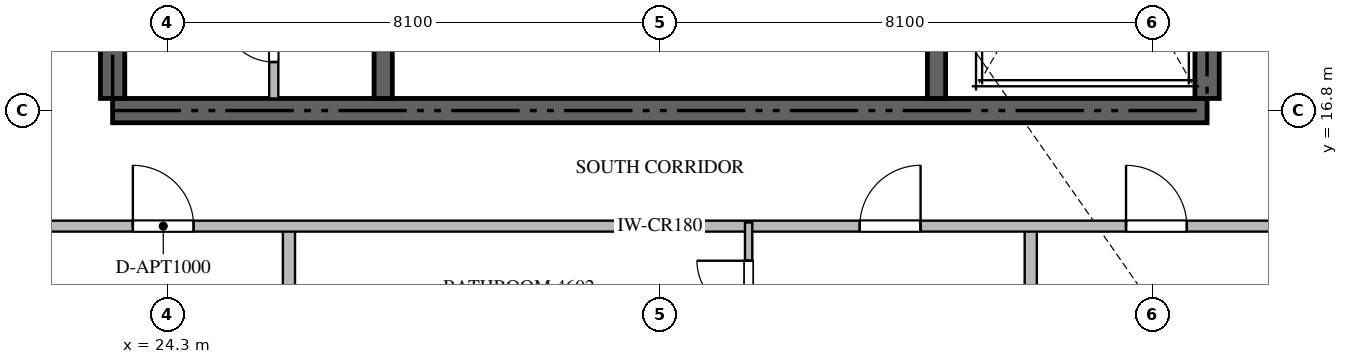
"""IFC4 building model, lengths in metres.
Left out: names, types, materials, properties, quantities, classifications, styles, units other than length and angle.
Written with IfcOpenShell. Run it as: python <this file> out.ifc"""

import sys

from ifc_helpers import new_model, si_unit, direction, frame, frame_2d, origin, place, context, subcontext, project, spatial, rectangle, extrude, source, transform, mapped, element, fill, save


model = new_model("IFC4")
c1 = context("Model", 3, precision=1e-05, world=origin(), true_north=direction((0.0, 1.0)))
c2 = subcontext(c1, "Body", "Model", "MODEL_VIEW")
j1 = project(units=[si_unit("LENGTHUNIT", "METRE"), si_unit("PLANEANGLEUNIT", "RADIAN")], contexts=[c1])
p1 = place(None, origin())
s1 = spatial("IfcSite", under=j1, at=p1, CompositionType="ELEMENT")
p2 = place(p1, origin())
s2 = spatial("IfcBuilding", under=s1, at=p2, CompositionType="ELEMENT")
p3 = place(p2, frame((0.0, 0.0, 183.9)))
s3 = spatial("IfcBuildingStorey", under=s2, at=p3, CompositionType="ELEMENT", Elevation=183.9)
p4 = place(p3, frame((23.4, 16.8, -0.26), z_axis=(0.0, 0.0, 1.0), x_axis=(1.0, 0.0, 0.0)))
e1 = element("IfcWall", 1, at=p4, inside=s3, PredefinedType="SHEAR", context=c2, shape_type="SweptSolid", body=[
    extrude(rectangle(XDim=18.0, YDim=0.4, at=frame_2d((9.0, 0.0))), origin(), (0.0, 0.0, 1.0), 3.748),
])
p5 = place(p3, frame((23.4, 17.0, -0.26), z_axis=(0.0, 0.0, 1.0), x_axis=(0.0, 1.0, 0.0)))
e2 = element("IfcWall", 2, at=p5, inside=s3, PredefinedType="SHEAR", context=c2, shape_type="SweptSolid", body=[
    extrude(rectangle(XDim=4.85, YDim=0.4, at=frame_2d((2.425, 0.0))), origin(), (0.0, 0.0, 1.0), 3.748),
])
p6 = place(p3, frame((41.4, 17.0, -0.26), z_axis=(0.0, 0.0, 1.0), x_axis=(0.0, 1.0, 0.0)))
e3 = element("IfcWall", 3, at=p6, inside=s3, PredefinedType="SHEAR", context=c2, shape_type="SweptSolid", body=[
    extrude(rectangle(XDim=8.35, YDim=0.4, at=frame_2d((4.175, 0.0))), origin(), (0.0, 0.0, 1.0), 3.748),
])
p7 = place(p3, frame((27.85, 17.0, -0.26), z_axis=(0.0, 0.0, 1.0), x_axis=(0.0, 1.0, 0.0)))
e4 = element("IfcWall", 4, at=p7, inside=s3, PredefinedType="SHEAR", context=c2, shape_type="SweptSolid", body=[
    extrude(rectangle(XDim=4.85, YDim=0.3, at=frame_2d((2.425, 0.0))), origin(), (0.0, 0.0, 1.0), 3.748),
])
p8 = place(p3, frame((36.95, 17.0, -0.26), z_axis=(0.0, 0.0, 1.0), x_axis=(0.0, 1.0, 0.0)))
e5 = element("IfcWall", 5, at=p8, inside=s3, PredefinedType="SHEAR", context=c2, shape_type="SweptSolid", body=[
    extrude(rectangle(XDim=8.35, YDim=0.3, at=frame_2d((4.175, 0.0))), origin(), (0.0, 0.0, 1.0), 3.748),
])
p9 = place(p3, frame((26.05, 17.0, 0.0), z_axis=(0.0, 0.0, 1.0), x_axis=(0.0, 1.0, 0.0)))
e6 = element("IfcWall", 6, at=p9, inside=s3, PredefinedType="PARTITIONING", context=c2, shape_type="SweptSolid", body=[
    extrude(rectangle(XDim=2.048, YDim=0.15, at=frame_2d((1.024, 0.0))), origin(), (0.0, 0.0, 1.0), 3.49),
])
p10 = place(p9, frame((0.599, 0.0, 0.0)))
e7 = element("IfcOpeningElement", 7, at=p10, cuts=e6, PredefinedType="OPENING", context=c2, shape_type="SweptSolid", body=[
    extrude(rectangle(XDim=0.85, YDim=2.1, at=frame_2d((0.425, 1.05))), frame((0.0, 0.085, 0.0), z_axis=(0.0, -1.0, 0.0), x_axis=(1.0, 0.0, 0.0)), (0.0, 0.0, 1.0), 0.17),
])
for number, where, z_axis, x_axis in (
    (8, (26.3, 1.482, 0.0), (0.0, 0.0, 1.0), (0.0, 1.0, 0.0)),
    (9, (38.5, 1.482, 0.0), (0.0, 0.0, 1.0), (0.0, 1.0, 0.0)),
):
    element("IfcWall", number, at=place(p3, frame(where, z_axis=z_axis, x_axis=x_axis)), inside=s3, PredefinedType="PARTITIONING", context=c2, shape_type="SweptSolid", body=[
        extrude(rectangle(XDim=13.418, YDim=0.2, at=frame_2d((6.709, 0.0))), origin(), (0.0, 0.0, 1.0), 3.49),
    ])
p11 = place(p3, frame((20.952, 14.9, 0.0), z_axis=(0.0, 0.0, 1.0), x_axis=(1.0, 0.0, 0.0)))
e10 = element("IfcWall", 10, at=p11, inside=s3, PredefinedType="PARTITIONING", context=c2, shape_type="SweptSolid", body=[
    extrude(rectangle(XDim=22.896, YDim=0.18, at=frame_2d((11.448, 0.0))), origin(), (0.0, 0.0, 1.0), 3.49),
])
p12 = place(p11, frame((2.781, 0.0, 0.0)))
e11 = element("IfcOpeningElement", 11, at=p12, cuts=e10, PredefinedType="OPENING", context=c2, shape_type="SweptSolid", body=[
    extrude(rectangle(XDim=1.0, YDim=2.15, at=frame_2d((0.5, 1.075))), frame((0.0, 0.1, 0.0), z_axis=(0.0, -1.0, 0.0), x_axis=(1.0, 0.0, 0.0)), (0.0, 0.0, 1.0), 0.2),
])
p13 = place(p11, frame((14.736, 0.0, 0.0)))
e12 = element("IfcOpeningElement", 12, at=p13, cuts=e10, PredefinedType="OPENING", context=c2, shape_type="SweptSolid", body=[
    extrude(rectangle(XDim=1.0, YDim=2.15, at=frame_2d((0.5, 1.075))), frame((0.0, 0.1, 0.0), z_axis=(0.0, -1.0, 0.0), x_axis=(1.0, 0.0, 0.0)), (0.0, 0.0, 1.0), 0.2),
])
p14 = place(p11, frame((19.115, 0.0, 0.0)))
e13 = element("IfcOpeningElement", 13, at=p14, cuts=e10, PredefinedType="OPENING", context=c2, shape_type="SweptSolid", body=[
    extrude(rectangle(XDim=1.0, YDim=2.15, at=frame_2d((0.5, 1.075))), frame((0.0, 0.1, 0.0), z_axis=(0.0, -1.0, 0.0), x_axis=(1.0, 0.0, 0.0)), (0.0, 0.0, 1.0), 0.2),
])
p15 = place(p3, frame((33.86, 12.852, 0.0), z_axis=(0.0, 0.0, 1.0), x_axis=(0.0, 1.0, 0.0)))
e14 = element("IfcWall", 14, at=p15, inside=s3, PredefinedType="PARTITIONING", context=c2, shape_type="SweptSolid", body=[
    extrude(rectangle(XDim=2.108, YDim=0.12, at=frame_2d((1.054, 0.0))), origin(), (0.0, 0.0, 1.0), 3.49),
])
p16 = place(p15, frame((0.629, 0.0, 0.0)))
e15 = element("IfcOpeningElement", 15, at=p16, cuts=e14, PredefinedType="OPENING", context=c2, shape_type="SweptSolid", body=[
    extrude(rectangle(XDim=0.85, YDim=2.1, at=frame_2d((0.425, 1.05))), frame((0.0, 0.07, 0.0), z_axis=(0.0, -1.0, 0.0), x_axis=(1.0, 0.0, 0.0)), (0.0, 0.0, 1.0), 0.14),
])
m1 = source(origin(), c2, "Body", "SweptSolid", [
    extrude(rectangle(XDim=0.85, YDim=2.1, at=frame_2d((0.425, 1.05))), frame((0.0, 0.025, 0.0), z_axis=(0.0, -1.0, 0.0), x_axis=(1.0, 0.0, 0.0)), (0.0, 0.0, 1.0), 0.05),
])
p17 = place(p10, origin())
e16 = element("IfcDoor", 16, at=p17, inside=s3, OperationType="SINGLE_SWING_RIGHT", PredefinedType="DOOR", context=c2, shape_type="MappedRepresentation", body=[
    mapped(m1, transform((0.0, 0.0, 0.0), scale=1.0)),
])
fill(e7, e16)
m2 = source(origin(), c2, "Body", "SweptSolid", [
    extrude(rectangle(XDim=1.0, YDim=2.15, at=frame_2d((0.5, 1.075))), frame((0.0, 0.025, 0.0), z_axis=(0.0, -1.0, 0.0), x_axis=(1.0, 0.0, 0.0)), (0.0, 0.0, 1.0), 0.05),
])
p18 = place(p12, origin())
e17 = element("IfcDoor", 17, at=p18, inside=s3, OperationType="SINGLE_SWING_LEFT", PredefinedType="DOOR", context=c2, shape_type="MappedRepresentation", body=[
    mapped(m2, transform((0.0, 0.0, 0.0), scale=1.0)),
])
fill(e11, e17)
p19 = place(p13, origin())
e18 = element("IfcDoor", 18, at=p19, inside=s3, OperationType="SINGLE_SWING_RIGHT", PredefinedType="DOOR", context=c2, shape_type="MappedRepresentation", body=[
    mapped(m2, transform((0.0, 0.0, 0.0), scale=1.0)),
])
fill(e12, e18)
p20 = place(p14, origin())
e19 = element("IfcDoor", 19, at=p20, inside=s3, OperationType="SINGLE_SWING_LEFT", PredefinedType="DOOR", context=c2, shape_type="MappedRepresentation", body=[
    mapped(m2, transform((0.0, 0.0, 0.0), scale=1.0)),
])
fill(e13, e19)
p21 = place(p16, origin())
e20 = element("IfcDoor", 20, at=p21, inside=s3, OperationType="SINGLE_SWING_RIGHT", PredefinedType="DOOR", context=c2, shape_type="MappedRepresentation", body=[
    mapped(m1, transform((0.0, 0.0, 0.0), scale=1.0)),
])
fill(e15, e20)
save(model, sys.argv[1])
